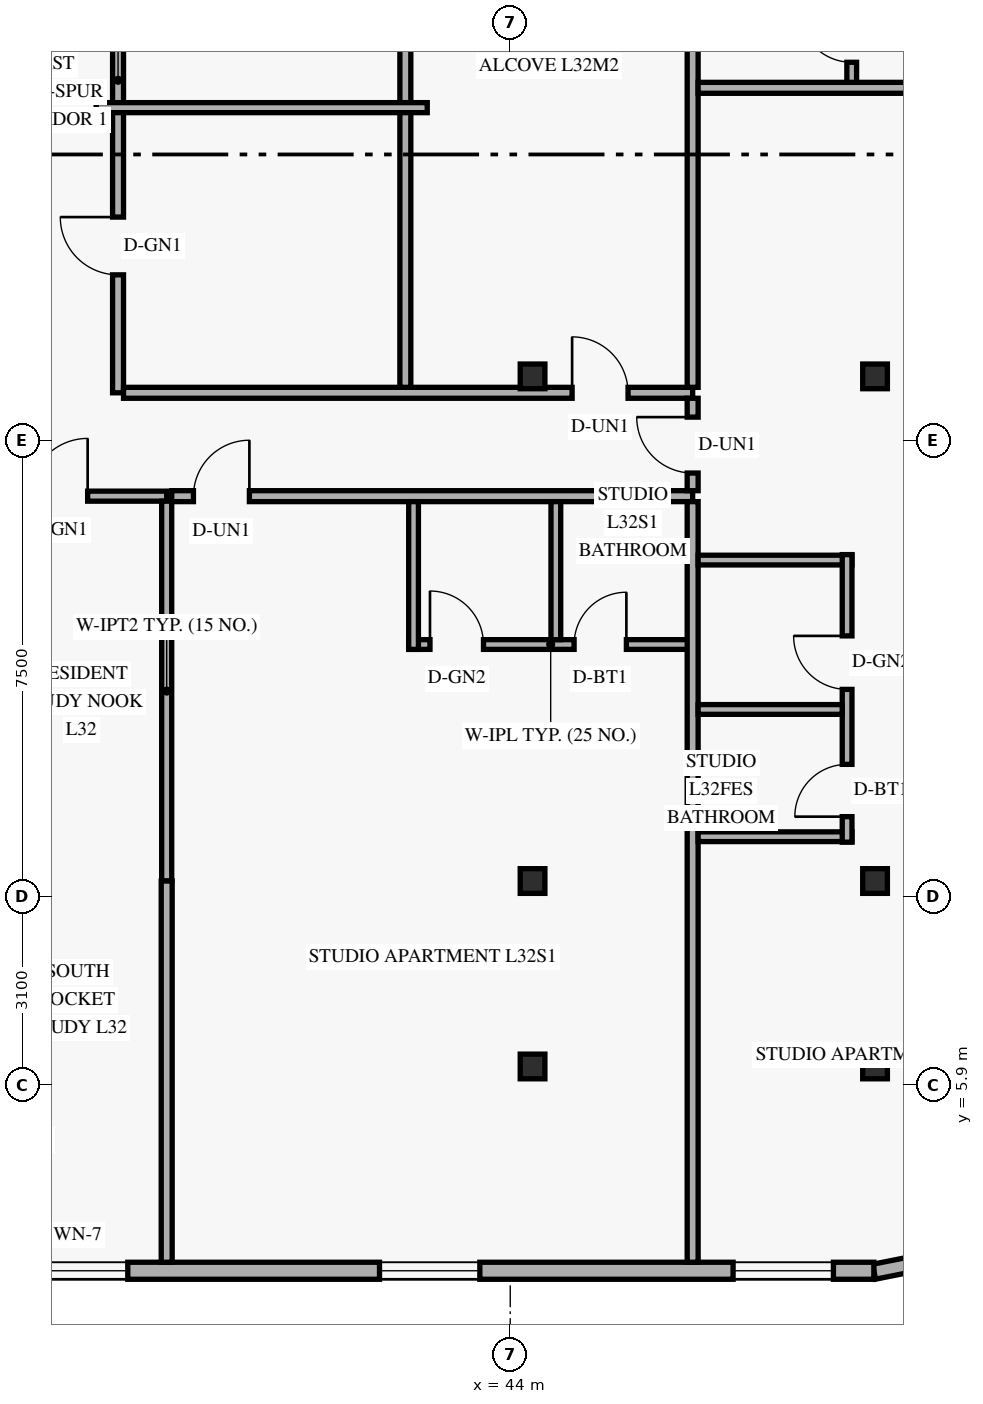
"""IFC4 building model, lengths in metres.
Left out: names, types, materials, properties, quantities, classifications, styles, units other than length and angle.
Written with IfcOpenShell. Run it as: python <this file> out.ifc"""

import sys

from ifc_helpers import new_model, si_unit, direction, frame, frame_2d, origin, origin_2d, place, context, subcontext, project, spatial, rectangle, hollow_rectangle, extrude, element, fill, save


model = new_model("IFC4")
c1 = context("Model", 3, precision=1e-05, world=origin(), true_north=direction((0.0, 1.0)))
c2 = subcontext(c1, "Body", "Model", "MODEL_VIEW")
j1 = project(units=[si_unit("LENGTHUNIT", "METRE"), si_unit("PLANEANGLEUNIT", "RADIAN")], contexts=[c1])
p1 = place(None, origin())
s1 = spatial("IfcSite", under=j1, at=p1, CompositionType="ELEMENT")
p2 = place(p1, origin())
s2 = spatial("IfcBuilding", under=s1, at=p2, CompositionType="ELEMENT")
p3 = place(p2, frame((0.0, 0.0, 124.8)))
s3 = spatial("IfcBuildingStorey", under=s2, at=p3, CompositionType="ELEMENT", Elevation=124.8)
for number, where, z_axis, x_axis in (
    (1, (44.304, 6.2, 0.0), (0.035, 0.0, 0.999), (0.0, 1.0, 0.0)),
    (2, (44.304, 9.25, 0.0), (0.035, 0.0, 0.999), (0.0, 1.0, 0.0)),
    (3, (44.304, 17.55, 0.0), (0.035, 0.0, 0.999), (0.0, 1.0, 0.0)),
):
    element("IfcColumn", number, at=place(p3, frame(where, z_axis=z_axis, x_axis=x_axis)), inside=s3, PredefinedType="COLUMN", context=c2, shape_type="SweptSolid", body=[
        extrude(hollow_rectangle(XDim=0.406, YDim=0.406, WallThickness=0.016, at=origin_2d()), origin(), (0.0, 0.0, 1.0), 3.602),
    ])
for number, where, z_axis, x_axis in (
    (4, (49.895, 6.2, 0.0), (0.058, 0.0, 0.998), (0.0, 1.0, 0.0)),
    (5, (49.895, 9.25, 0.0), (0.058, 0.0, 0.998), (0.0, 1.0, 0.0)),
    (6, (49.895, 17.55, 0.0), (0.058, 0.0, 0.998), (0.0, 1.0, 0.0)),
):
    element("IfcColumn", number, at=place(p3, frame(where, z_axis=z_axis, x_axis=x_axis)), inside=s3, PredefinedType="COLUMN", context=c2, shape_type="SweptSolid", body=[
        extrude(hollow_rectangle(XDim=0.406, YDim=0.406, WallThickness=0.016, at=origin_2d()), origin(), (0.0, 0.0, 1.0), 3.606),
    ])
p4 = place(p3, frame((49.983, 2.824, 0.0), z_axis=(0.0, 0.0, 1.0), x_axis=(0.980809899341, 0.19496651342, 0.0)))
e7 = element("IfcWall", 7, at=p4, inside=s3, PredefinedType="SOLIDWALL", context=c2, shape_type="SweptSolid", body=[
    extrude(rectangle(XDim=1.389, YDim=0.25, at=frame_2d((0.694, 0.0))), origin(), (0.0, 0.0, 1.0), 3.36),
])
p5 = place(p3, frame((13.42, 2.84, 0.0), z_axis=(0.0, 0.0, 1.0), x_axis=(1.0, 0.0, 0.0)))
e8 = element("IfcWall", 8, at=p5, inside=s3, PredefinedType="SOLIDWALL", context=c2, shape_type="SweptSolid", body=[
    extrude(rectangle(XDim=36.56, YDim=0.28, at=frame_2d((18.28, 0.0))), origin(), (0.0, 0.0, 1.0), 3.36),
])
p6 = place(p5, frame((3.29, 0.0, 0.85)))
e9 = element("IfcOpeningElement", 9, at=p6, cuts=e8, PredefinedType="OPENING", context=c2, shape_type="SweptSolid", body=[
    extrude(rectangle(XDim=1.65, YDim=1.6, at=frame_2d((0.825, 0.8))), frame((0.0, 0.15, 0.0), z_axis=(0.0, -1.0, 0.0), x_axis=(1.0, 0.0, 0.0)), (0.0, 0.0, 1.0), 0.3),
])
p7 = place(p5, frame((10.48, 0.0, 0.85)))
e10 = element("IfcOpeningElement", 10, at=p7, cuts=e8, PredefinedType="OPENING", context=c2, shape_type="SweptSolid", body=[
    extrude(rectangle(XDim=1.65, YDim=1.6, at=frame_2d((0.825, 0.8))), frame((0.0, 0.15, 0.0), z_axis=(0.0, -1.0, 0.0), x_axis=(1.0, 0.0, 0.0)), (0.0, 0.0, 1.0), 0.3),
])
p8 = place(p5, frame((17.365, 0.0, 0.85)))
e11 = element("IfcOpeningElement", 11, at=p8, cuts=e8, PredefinedType="OPENING", context=c2, shape_type="SweptSolid", body=[
    extrude(rectangle(XDim=1.65, YDim=1.6, at=frame_2d((0.825, 0.8))), frame((0.0, 0.15, 0.0), z_axis=(0.0, -1.0, 0.0), x_axis=(1.0, 0.0, 0.0)), (0.0, 0.0, 1.0), 0.3),
])
p9 = place(p5, frame((22.64, 0.0, 0.85)))
e12 = element("IfcOpeningElement", 12, at=p9, cuts=e8, PredefinedType="OPENING", context=c2, shape_type="SweptSolid", body=[
    extrude(rectangle(XDim=1.65, YDim=1.6, at=frame_2d((0.825, 0.8))), frame((0.0, 0.15, 0.0), z_axis=(0.0, -1.0, 0.0), x_axis=(1.0, 0.0, 0.0)), (0.0, 0.0, 1.0), 0.3),
])
p10 = place(p5, frame((28.43, 0.0, 0.85)))
e13 = element("IfcOpeningElement", 13, at=p10, cuts=e8, PredefinedType="OPENING", context=c2, shape_type="SweptSolid", body=[
    extrude(rectangle(XDim=1.65, YDim=1.6, at=frame_2d((0.825, 0.8))), frame((0.0, 0.15, 0.0), z_axis=(0.0, -1.0, 0.0), x_axis=(1.0, 0.0, 0.0)), (0.0, 0.0, 1.0), 0.3),
])
p11 = place(p5, frame((34.245, 0.0, 0.85)))
e14 = element("IfcOpeningElement", 14, at=p11, cuts=e8, PredefinedType="OPENING", context=c2, shape_type="SweptSolid", body=[
    extrude(rectangle(XDim=1.65, YDim=1.6, at=frame_2d((0.825, 0.8))), frame((0.0, 0.15, 0.0), z_axis=(0.0, -1.0, 0.0), x_axis=(1.0, 0.0, 0.0)), (0.0, 0.0, 1.0), 0.3),
])
p12 = place(p3, frame((32.732, 15.58, 0.0), z_axis=(0.0, 0.0, 1.0), x_axis=(1.0, 0.0, 0.0)))
e15 = element("IfcWall", 15, at=p12, inside=s3, PredefinedType="PARTITIONING", context=c2, shape_type="SweptSolid", body=[
    extrude(rectangle(XDim=5.618, YDim=0.165, at=frame_2d((2.809, 0.0))), origin(), (0.0, 0.0, 1.0), 2.731),
])
p13 = place(p12, frame((0.768, 0.0, 0.0)))
e16 = element("IfcOpeningElement", 16, at=p13, cuts=e15, PredefinedType="OPENING", context=c2, shape_type="SweptSolid", body=[
    extrude(rectangle(XDim=0.9, YDim=2.1, at=frame_2d((0.45, 1.05))), frame((0.0, 0.093, 0.0), z_axis=(0.0, -1.0, 0.0), x_axis=(1.0, 0.0, 0.0)), (0.0, 0.0, 1.0), 0.185),
])
p14 = place(p12, frame((3.367, 0.0, 0.0)))
e17 = element("IfcOpeningElement", 17, at=p14, cuts=e15, PredefinedType="OPENING", context=c2, shape_type="SweptSolid", body=[
    extrude(rectangle(XDim=0.95, YDim=2.15, at=frame_2d((0.475, 1.075))), frame((0.0, 0.093, 0.0), z_axis=(0.0, -1.0, 0.0), x_axis=(1.0, 0.0, 0.0)), (0.0, 0.0, 1.0), 0.185),
])
p15 = place(p3, frame((38.35, 9.25, 0.0), z_axis=(0.0, 0.0, 1.0), x_axis=(0.0, 1.0, 0.0)))
e18 = element("IfcWall", 18, at=p15, inside=s3, PredefinedType="PARTITIONING", context=c2, shape_type="SweptSolid", body=[
    extrude(rectangle(XDim=6.248, YDim=0.165, at=frame_2d((3.124, 0.0))), origin(), (0.0, 0.0, 1.0), 2.731),
])
p16 = place(p3, frame((37.55, 17.28, 0.0), z_axis=(0.0, 0.0, 1.0), x_axis=(0.0, 1.0, 0.0)))
e19 = element("IfcWall", 19, at=p16, inside=s3, PredefinedType="STANDARD", context=c2, shape_type="SweptSolid", body=[
    extrude(rectangle(XDim=10.28, YDim=0.18, at=frame_2d((5.14, 0.0))), origin(), (0.0, 0.0, 1.0), 2.731),
])
p17 = place(p16, frame((1.94, 0.0, 0.0)))
e20 = element("IfcOpeningElement", 20, at=p17, cuts=e19, PredefinedType="OPENING", context=c2, shape_type="SweptSolid", body=[
    extrude(rectangle(XDim=0.95, YDim=2.15, at=frame_2d((0.475, 1.075))), frame((0.0, 0.1, 0.0), z_axis=(0.0, -1.0, 0.0), x_axis=(1.0, 0.0, 0.0)), (0.0, 0.0, 1.0), 0.2),
])
p18 = place(p16, frame((6.99, 0.0, 0.0)))
e21 = element("IfcOpeningElement", 21, at=p18, cuts=e19, PredefinedType="OPENING", context=c2, shape_type="SweptSolid", body=[
    extrude(rectangle(XDim=0.95, YDim=2.15, at=frame_2d((0.475, 1.075))), frame((0.0, 0.1, 0.0), z_axis=(0.0, -1.0, 0.0), x_axis=(1.0, 0.0, 0.0)), (0.0, 0.0, 1.0), 0.2),
])
p19 = place(p3, frame((38.433, 15.58, 0.0), z_axis=(0.0, 0.0, 1.0), x_axis=(1.0, 0.0, 0.0)))
e22 = element("IfcWall", 22, at=p19, inside=s3, PredefinedType="STANDARD", context=c2, shape_type="SweptSolid", body=[
    extrude(rectangle(XDim=8.567, YDim=0.18, at=frame_2d((4.284, 0.0))), origin(), (0.0, 0.0, 1.0), 2.731),
])
p20 = place(p19, frame((0.357, 0.0, 0.0)))
e23 = element("IfcOpeningElement", 23, at=p20, cuts=e22, PredefinedType="OPENING", context=c2, shape_type="SweptSolid", body=[
    extrude(rectangle(XDim=0.92, YDim=2.15, at=frame_2d((0.46, 1.075))), frame((0.0, 0.1, 0.0), z_axis=(0.0, -1.0, 0.0), x_axis=(1.0, 0.0, 0.0)), (0.0, 0.0, 1.0), 0.2),
])
p21 = place(p3, frame((37.64, 17.28, 0.0), z_axis=(0.0, 0.0, 1.0), x_axis=(1.0, 0.0, 0.0)))
e24 = element("IfcWall", 24, at=p21, inside=s3, PredefinedType="STANDARD", context=c2, shape_type="SweptSolid", body=[
    extrude(rectangle(XDim=9.36, YDim=0.18, at=frame_2d((4.68, 0.0))), origin(), (0.0, 0.0, 1.0), 2.731),
])
p22 = place(p21, frame((7.377, 0.0, 0.0)))
e25 = element("IfcOpeningElement", 25, at=p22, cuts=e24, PredefinedType="OPENING", context=c2, shape_type="SweptSolid", body=[
    extrude(rectangle(XDim=0.92, YDim=2.15, at=frame_2d((0.46, 1.075))), frame((0.0, 0.1, 0.0), z_axis=(0.0, -1.0, 0.0), x_axis=(1.0, 0.0, 0.0)), (0.0, 0.0, 1.0), 0.2),
])
p23 = place(p3, frame((38.35, 2.98, 0.0), z_axis=(0.0, 0.0, 1.0), x_axis=(0.0, 1.0, 0.0)))
e26 = element("IfcWall", 26, at=p23, inside=s3, PredefinedType="PARTITIONING", context=c2, shape_type="SweptSolid", body=[
    extrude(rectangle(XDim=6.27, YDim=0.18, at=frame_2d((3.135, 0.0))), origin(), (0.0, 0.0, 1.0), 2.731),
])
p24 = place(p3, frame((42.33, 13.14, 0.0), z_axis=(0.0, 0.0, 1.0), x_axis=(1.0, 0.0, 0.0)))
e27 = element("IfcWall", 27, at=p24, inside=s3, PredefinedType="PLUMBINGWALL", context=c2, shape_type="SweptSolid", body=[
    extrude(rectangle(XDim=4.67, YDim=0.16, at=frame_2d((2.335, 0.0))), origin(), (0.0, 0.0, 1.0), 2.731),
])
p25 = place(p24, frame((0.35, 0.0, 0.0)))
e28 = element("IfcOpeningElement", 28, at=p25, cuts=e27, PredefinedType="OPENING", context=c2, shape_type="SweptSolid", body=[
    extrude(rectangle(XDim=0.88, YDim=2.12, at=frame_2d((0.44, 1.06))), frame((0.0, 0.09, 0.0), z_axis=(0.0, -1.0, 0.0), x_axis=(1.0, 0.0, 0.0)), (0.0, 0.0, 1.0), 0.18),
])
p26 = place(p24, frame((2.72, 0.0, 0.0)))
e29 = element("IfcOpeningElement", 29, at=p26, cuts=e27, PredefinedType="OPENING", context=c2, shape_type="SweptSolid", body=[
    extrude(rectangle(XDim=0.86, YDim=2.12, at=frame_2d((0.43, 1.06))), frame((0.0, 0.09, 0.0), z_axis=(0.0, -1.0, 0.0), x_axis=(1.0, 0.0, 0.0)), (0.0, 0.0, 1.0), 0.18),
])
p27 = place(p3, frame((42.41, 13.06, 0.0), z_axis=(0.0, 0.0, 1.0), x_axis=(0.0, 1.0, 0.0)))
e30 = element("IfcWall", 30, at=p27, inside=s3, PredefinedType="PLUMBINGWALL", context=c2, shape_type="SweptSolid", body=[
    extrude(rectangle(XDim=2.43, YDim=0.16, at=frame_2d((1.215, 0.0))), origin(), (0.0, 0.0, 1.0), 2.988),
])
p28 = place(p3, frame((44.75, 13.22, 0.0), z_axis=(0.0, 0.0, 1.0), x_axis=(0.0, 1.0, 0.0)))
e31 = element("IfcWall", 31, at=p28, inside=s3, PredefinedType="PLUMBINGWALL", context=c2, shape_type="SweptSolid", body=[
    extrude(rectangle(XDim=2.27, YDim=0.16, at=frame_2d((1.135, 0.0))), origin(), (0.0, 0.0, 1.0), 2.988),
])
p29 = place(p3, frame((42.275, 17.37, 0.0), z_axis=(0.0, 0.0, 1.0), x_axis=(0.0, 1.0, 0.0)))
e32 = element("IfcWall", 32, at=p29, inside=s3, PredefinedType="PARTITIONING", context=c2, shape_type="SweptSolid", body=[
    extrude(rectangle(XDim=10.1, YDim=0.18, at=frame_2d((5.05, 0.0))), origin(), (0.0, 0.0, 1.0), 2.731),
])
p30 = place(p3, frame((37.19, 21.97, 0.0), z_axis=(0.0, 0.0, 1.0), x_axis=(1.0, 0.0, 0.0)))
e33 = element("IfcWall", 33, at=p30, inside=s3, PredefinedType="PARTITIONING", context=c2, shape_type="SweptSolid", body=[
    extrude(rectangle(XDim=5.445, YDim=0.165, at=frame_2d((2.723, 0.0))), origin(), (0.0, 0.0, 1.0), 3.36),
])
p31 = place(p3, frame((47.0, 15.67, 0.0), z_axis=(0.0, 0.0, 1.0), x_axis=(0.0, 1.0, 0.0)))
e34 = element("IfcWall", 34, at=p31, inside=s3, PredefinedType="STANDARD", context=c2, shape_type="SweptSolid", body=[
    extrude(rectangle(XDim=1.52, YDim=0.18, at=frame_2d((0.76, 0.0))), origin(), (0.0, 0.0, 1.0), 3.36),
])
p32 = place(p31, frame((0.29, 0.0, 0.0)))
e35 = element("IfcOpeningElement", 35, at=p32, cuts=e34, PredefinedType="OPENING", context=c2, shape_type="SweptSolid", body=[
    extrude(rectangle(XDim=0.92, YDim=2.15, at=frame_2d((0.46, 1.075))), frame((0.0, 0.1, 0.0), z_axis=(0.0, -1.0, 0.0), x_axis=(1.0, 0.0, 0.0)), (0.0, 0.0, 1.0), 0.2),
])
p33 = place(p3, frame((47.0, 2.98, 0.0), z_axis=(0.0, 0.0, 1.0), x_axis=(0.0, 1.0, 0.0)))
e36 = element("IfcWall", 36, at=p33, inside=s3, PredefinedType="PARTITIONING", context=c2, shape_type="SweptSolid", body=[
    extrude(rectangle(XDim=12.51, YDim=0.18, at=frame_2d((6.255, 0.0))), origin(), (0.0, 0.0, 1.0), 2.731),
])
p34 = place(p3, frame((47.0, 17.37, 0.0), z_axis=(0.0, 0.0, 1.0), x_axis=(0.0, 1.0, 0.0)))
e37 = element("IfcWall", 37, at=p34, inside=s3, PredefinedType="PARTITIONING", context=c2, shape_type="SweptSolid", body=[
    extrude(rectangle(XDim=10.1, YDim=0.18, at=frame_2d((5.05, 0.0))), origin(), (0.0, 0.0, 1.0), 2.731),
])
p35 = place(p3, frame((47.09, 22.296, 0.0), z_axis=(0.0, 0.0, 1.0), x_axis=(1.0, 0.0, 0.0)))
e38 = element("IfcWall", 38, at=p35, inside=s3, PredefinedType="PARTITIONING", context=c2, shape_type="SweptSolid", body=[
    extrude(rectangle(XDim=6.23, YDim=0.18, at=frame_2d((3.115, 0.0))), origin(), (0.0, 0.0, 1.0), 2.809),
])
for number, where, z_axis, x_axis in (
    (39, (47.09, 9.979, 0.0), (0.0, 0.0, 1.0), (1.0, 0.0, 0.0)),
    (40, (47.09, 14.529, 0.0), (0.0, 0.0, 1.0), (1.0, 0.0, 0.0)),
):
    element("IfcWall", number, at=place(p3, frame(where, z_axis=z_axis, x_axis=x_axis)), inside=s3, PredefinedType="PLUMBINGWALL", context=c2, shape_type="SweptSolid", body=[
        extrude(rectangle(XDim=2.53, YDim=0.16, at=frame_2d((1.265, 0.0))), origin(), (0.0, 0.0, 1.0), 3.36),
    ])
p36 = place(p3, frame((49.54, 9.889, 0.0), z_axis=(0.0, 0.0, 1.0), x_axis=(0.0, 1.0, 0.0)))
e41 = element("IfcWall", 41, at=p36, inside=s3, PredefinedType="PLUMBINGWALL", context=c2, shape_type="SweptSolid", body=[
    extrude(rectangle(XDim=4.73, YDim=0.16, at=frame_2d((2.365, 0.0))), origin(), (0.0, 0.0, 1.0), 2.988),
])
p37 = place(p36, frame((0.42, 0.0, 0.0)))
e42 = element("IfcOpeningElement", 42, at=p37, cuts=e41, PredefinedType="OPENING", context=c2, shape_type="SweptSolid", body=[
    extrude(rectangle(XDim=0.86, YDim=2.12, at=frame_2d((0.43, 1.06))), frame((0.0, 0.09, 0.0), z_axis=(0.0, -1.0, 0.0), x_axis=(1.0, 0.0, 0.0)), (0.0, 0.0, 1.0), 0.18),
])
p38 = place(p36, frame((2.513, 0.0, 0.0)))
e43 = element("IfcOpeningElement", 43, at=p38, cuts=e41, PredefinedType="OPENING", context=c2, shape_type="SweptSolid", body=[
    extrude(rectangle(XDim=0.88, YDim=2.12, at=frame_2d((0.44, 1.06))), frame((0.0, 0.09, 0.0), z_axis=(0.0, -1.0, 0.0), x_axis=(1.0, 0.0, 0.0)), (0.0, 0.0, 1.0), 0.18),
])
p39 = place(p3, frame((47.09, 12.072, 0.0), z_axis=(0.0, 0.0, 1.0), x_axis=(1.0, 0.0, 0.0)))
e44 = element("IfcWall", 44, at=p39, inside=s3, PredefinedType="PLUMBINGWALL", context=c2, shape_type="SweptSolid", body=[
    extrude(rectangle(XDim=2.37, YDim=0.16, at=frame_2d((1.185, 0.0))), origin(), (0.0, 0.0, 1.0), 3.36),
])
p40 = place(p3, frame((49.616, 22.386, 0.0), z_axis=(0.0, 0.0, 1.0), x_axis=(0.0, 1.0, 0.0)))
e45 = element("IfcWall", 45, at=p40, inside=s3, PredefinedType="PLUMBINGWALL", context=c2, shape_type="SweptSolid", body=[
    extrude(rectangle(XDim=4.64, YDim=0.16, at=frame_2d((2.32, 0.0))), origin(), (0.0, 0.0, 1.0), 3.36),
])
p41 = place(p40, frame((0.33, 0.0, 0.0)))
e46 = element("IfcOpeningElement", 46, at=p41, cuts=e45, PredefinedType="OPENING", context=c2, shape_type="SweptSolid", body=[
    extrude(rectangle(XDim=0.86, YDim=2.12, at=frame_2d((0.43, 1.06))), frame((0.0, 0.09, 0.0), z_axis=(0.0, -1.0, 0.0), x_axis=(1.0, 0.0, 0.0)), (0.0, 0.0, 1.0), 0.18),
])
p42 = place(p40, frame((2.423, 0.0, 0.0)))
e47 = element("IfcOpeningElement", 47, at=p42, cuts=e45, PredefinedType="OPENING", context=c2, shape_type="SweptSolid", body=[
    extrude(rectangle(XDim=0.88, YDim=2.12, at=frame_2d((0.44, 1.06))), frame((0.0, 0.09, 0.0), z_axis=(0.0, -1.0, 0.0), x_axis=(1.0, 0.0, 0.0)), (0.0, 0.0, 1.0), 0.18),
])
p43 = place(p9, origin())
e48 = element("IfcWindow", 48, at=p43, inside=s3, PartitioningType="SINGLE_PANEL", PredefinedType="WINDOW", context=c2, shape_type="SweptSolid", body=[
    extrude(rectangle(XDim=1.65, YDim=1.6, at=frame_2d((0.825, 0.8))), frame((0.0, 0.03, 0.0), z_axis=(0.0, -1.0, 0.0), x_axis=(1.0, 0.0, 0.0)), (0.0, 0.0, 1.0), 0.06),
])
fill(e12, e48)
p44 = place(p10, origin())
e49 = element("IfcWindow", 49, at=p44, inside=s3, PartitioningType="SINGLE_PANEL", PredefinedType="WINDOW", context=c2, shape_type="SweptSolid", body=[
    extrude(rectangle(XDim=1.65, YDim=1.6, at=frame_2d((0.825, 0.8))), frame((0.0, 0.03, 0.0), z_axis=(0.0, -1.0, 0.0), x_axis=(1.0, 0.0, 0.0)), (0.0, 0.0, 1.0), 0.06),
])
fill(e13, e49)
p45 = place(p11, origin())
e50 = element("IfcWindow", 50, at=p45, inside=s3, PartitioningType="SINGLE_PANEL", PredefinedType="WINDOW", context=c2, shape_type="SweptSolid", body=[
    extrude(rectangle(XDim=1.65, YDim=1.6, at=frame_2d((0.825, 0.8))), frame((0.0, 0.03, 0.0), z_axis=(0.0, -1.0, 0.0), x_axis=(1.0, 0.0, 0.0)), (0.0, 0.0, 1.0), 0.06),
])
fill(e14, e50)
p46 = place(p14, origin())
e51 = element("IfcDoor", 51, at=p46, inside=s3, OperationType="SINGLE_SWING_RIGHT", PredefinedType="DOOR", context=c2, shape_type="SweptSolid", body=[
    extrude(rectangle(XDim=0.95, YDim=2.15, at=frame_2d((0.475, 1.075))), frame((0.0, 0.025, 0.0), z_axis=(0.0, -1.0, 0.0), x_axis=(1.0, 0.0, 0.0)), (0.0, 0.0, 1.0), 0.05),
])
fill(e17, e51)
p47 = place(p20, origin())
e52 = element("IfcDoor", 52, at=p47, inside=s3, OperationType="SINGLE_SWING_RIGHT", PredefinedType="DOOR", context=c2, shape_type="SweptSolid", body=[
    extrude(rectangle(XDim=0.92, YDim=2.15, at=frame_2d((0.46, 1.075))), frame((0.0, 0.025, 0.0), z_axis=(0.0, -1.0, 0.0), x_axis=(1.0, 0.0, 0.0)), (0.0, 0.0, 1.0), 0.05),
])
fill(e23, e52)
p48 = place(p25, origin())
e53 = element("IfcDoor", 53, at=p48, inside=s3, OperationType="SINGLE_SWING_LEFT", PredefinedType="DOOR", context=c2, shape_type="SweptSolid", body=[
    extrude(rectangle(XDim=0.88, YDim=2.12, at=frame_2d((0.44, 1.06))), frame((0.0, 0.025, 0.0), z_axis=(0.0, -1.0, 0.0), x_axis=(1.0, 0.0, 0.0)), (0.0, 0.0, 1.0), 0.05),
])
fill(e28, e53)
p49 = place(p26, origin())
e54 = element("IfcDoor", 54, at=p49, inside=s3, OperationType="SINGLE_SWING_RIGHT", PredefinedType="DOOR", context=c2, shape_type="SweptSolid", body=[
    extrude(rectangle(XDim=0.86, YDim=2.12, at=frame_2d((0.43, 1.06))), frame((0.0, 0.025, 0.0), z_axis=(0.0, -1.0, 0.0), x_axis=(1.0, 0.0, 0.0)), (0.0, 0.0, 1.0), 0.05),
])
fill(e29, e54)
p50 = place(p17, origin())
e55 = element("IfcDoor", 55, at=p50, inside=s3, OperationType="SINGLE_SWING_RIGHT", PredefinedType="DOOR", context=c2, shape_type="SweptSolid", body=[
    extrude(rectangle(XDim=0.95, YDim=2.15, at=frame_2d((0.475, 1.075))), frame((0.0, 0.025, 0.0), z_axis=(0.0, -1.0, 0.0), x_axis=(1.0, 0.0, 0.0)), (0.0, 0.0, 1.0), 0.05),
])
fill(e20, e55)
p51 = place(p22, origin())
e56 = element("IfcDoor", 56, at=p51, inside=s3, OperationType="SINGLE_SWING_LEFT", PredefinedType="DOOR", context=c2, shape_type="SweptSolid", body=[
    extrude(rectangle(XDim=0.92, YDim=2.15, at=frame_2d((0.46, 1.075))), frame((0.0, 0.025, 0.0), z_axis=(0.0, -1.0, 0.0), x_axis=(1.0, 0.0, 0.0)), (0.0, 0.0, 1.0), 0.05),
])
fill(e25, e56)
p52 = place(p32, origin())
e57 = element("IfcDoor", 57, at=p52, inside=s3, OperationType="SINGLE_SWING_RIGHT", PredefinedType="DOOR", context=c2, shape_type="SweptSolid", body=[
    extrude(rectangle(XDim=0.92, YDim=2.15, at=frame_2d((0.46, 1.075))), frame((0.0, 0.025, 0.0), z_axis=(0.0, -1.0, 0.0), x_axis=(1.0, 0.0, 0.0)), (0.0, 0.0, 1.0), 0.05),
])
fill(e35, e57)
p53 = place(p37, origin())
e58 = element("IfcDoor", 58, at=p53, inside=s3, OperationType="SINGLE_SWING_LEFT", PredefinedType="DOOR", context=c2, shape_type="SweptSolid", body=[
    extrude(rectangle(XDim=0.86, YDim=2.12, at=frame_2d((0.43, 1.06))), frame((0.0, 0.025, 0.0), z_axis=(0.0, -1.0, 0.0), x_axis=(1.0, 0.0, 0.0)), (0.0, 0.0, 1.0), 0.05),
])
fill(e42, e58)
p54 = place(p38, origin())
e59 = element("IfcDoor", 59, at=p54, inside=s3, OperationType="SINGLE_SWING_RIGHT", PredefinedType="DOOR", context=c2, shape_type="SweptSolid", body=[
    extrude(rectangle(XDim=0.88, YDim=2.12, at=frame_2d((0.44, 1.06))), frame((0.0, 0.025, 0.0), z_axis=(0.0, -1.0, 0.0), x_axis=(1.0, 0.0, 0.0)), (0.0, 0.0, 1.0), 0.05),
])
fill(e43, e59)
p55 = place(p41, origin())
e60 = element("IfcDoor", 60, at=p55, inside=s3, OperationType="SINGLE_SWING_RIGHT", PredefinedType="DOOR", context=c2, shape_type="SweptSolid", body=[
    extrude(rectangle(XDim=0.86, YDim=2.12, at=frame_2d((0.43, 1.06))), frame((0.0, 0.025, 0.0), z_axis=(0.0, -1.0, 0.0), x_axis=(1.0, 0.0, 0.0)), (0.0, 0.0, 1.0), 0.05),
])
fill(e46, e60)
save(model, sys.argv[1])
